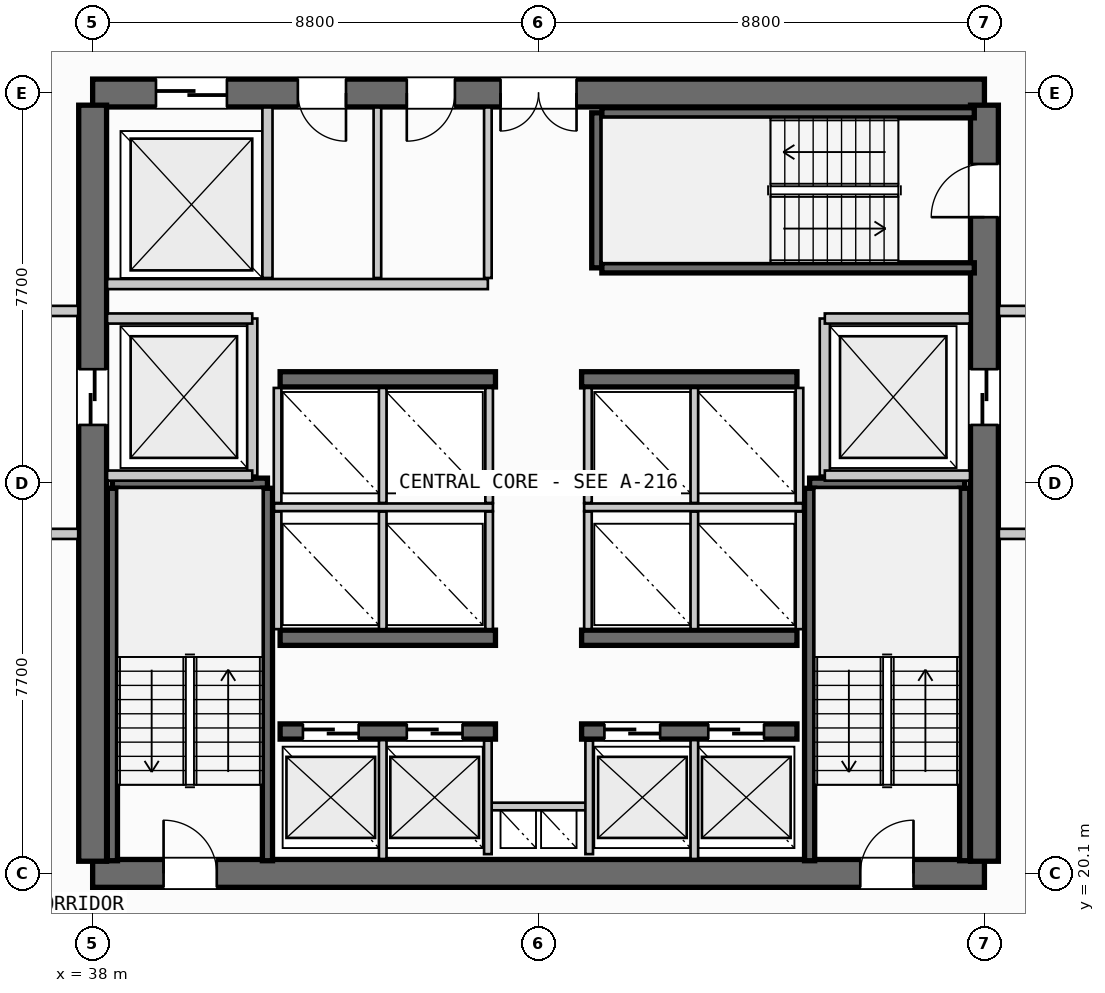
"""IFC4 building model, lengths in metres.
Left out: names, types, materials, properties, quantities, classifications, styles, units other than length and angle.
Written with IfcOpenShell. Run it as: python <this file> out.ifc"""

import sys

from ifc_helpers import new_model, si_unit, direction, frame, frame_2d, origin, place, context, subcontext, project, spatial, rectangle, extrude, source, transform, mapped, element, fill, save


model = new_model("IFC4")
c1 = context("Model", 3, precision=1e-05, world=origin(), true_north=direction((0.0, 1.0)))
c2 = subcontext(c1, "Body", "Model", "MODEL_VIEW")
j1 = project(units=[si_unit("LENGTHUNIT", "METRE"), si_unit("PLANEANGLEUNIT", "RADIAN")], contexts=[c1])
p1 = place(None, origin())
s1 = spatial("IfcSite", under=j1, at=p1, CompositionType="ELEMENT")
p2 = place(p1, origin())
s2 = spatial("IfcBuilding", under=s1, at=p2, CompositionType="ELEMENT")
p3 = place(p2, frame((0.0, 0.0, 118.0)))
s3 = spatial("IfcBuildingStorey", under=s2, at=p3, CompositionType="ELEMENT", Elevation=118.0)
p4 = place(p3, frame((38.0, 20.1, 0.0), z_axis=(0.0, 0.0, 1.0), x_axis=(1.0, 0.0, 0.0)))
e1 = element("IfcWall", 1, at=p4, inside=s3, PredefinedType="SHEAR", context=c2, shape_type="SweptSolid", body=[
    extrude(rectangle(XDim=17.6, YDim=0.55, at=frame_2d((8.8, 0.0))), origin(), (0.0, 0.0, 1.0), 3.35),
])
p5 = place(p4, frame((1.4, 0.0, 0.0)))
e2 = element("IfcOpeningElement", 2, at=p5, cuts=e1, PredefinedType="OPENING", context=c2, shape_type="SweptSolid", body=[
    extrude(rectangle(XDim=1.05, YDim=2.15, at=frame_2d((0.525, 1.075))), frame((0.0, 0.285, 0.0), z_axis=(0.0, -1.0, 0.0), x_axis=(1.0, 0.0, 0.0)), (0.0, 0.0, 1.0), 0.57),
])
p6 = place(p4, frame((15.15, 0.0, 0.0)))
e3 = element("IfcOpeningElement", 3, at=p6, cuts=e1, PredefinedType="OPENING", context=c2, shape_type="SweptSolid", body=[
    extrude(rectangle(XDim=1.05, YDim=2.15, at=frame_2d((0.525, 1.075))), frame((0.0, 0.285, 0.0), z_axis=(0.0, -1.0, 0.0), x_axis=(1.0, 0.0, 0.0)), (0.0, 0.0, 1.0), 0.57),
])
p7 = place(p3, frame((55.6, 35.5, 0.0), z_axis=(0.0, 0.0, 1.0), x_axis=(-1.0, 0.0, 0.0)))
e4 = element("IfcWall", 4, at=p7, inside=s3, PredefinedType="SHEAR", context=c2, shape_type="SweptSolid", body=[
    extrude(rectangle(XDim=17.6, YDim=0.55, at=frame_2d((8.8, 0.0))), origin(), (0.0, 0.0, 1.0), 3.35),
])
p8 = place(p7, frame((8.05, 0.0, 0.0)))
e5 = element("IfcOpeningElement", 5, at=p8, cuts=e4, PredefinedType="OPENING", context=c2, shape_type="SweptSolid", body=[
    extrude(rectangle(XDim=1.5, YDim=2.2, at=frame_2d((0.75, 1.1))), frame((0.0, 0.285, 0.0), z_axis=(0.0, -1.0, 0.0), x_axis=(1.0, 0.0, 0.0)), (0.0, 0.0, 1.0), 0.57),
])
p9 = place(p7, frame((14.95, 0.0, 0.0)))
e6 = element("IfcOpeningElement", 6, at=p9, cuts=e4, PredefinedType="OPENING", context=c2, shape_type="SweptSolid", body=[
    extrude(rectangle(XDim=1.4, YDim=2.3, at=frame_2d((0.7, 1.15))), frame((0.0, 0.285, 0.0), z_axis=(0.0, -1.0, 0.0), x_axis=(1.0, 0.0, 0.0)), (0.0, 0.0, 1.0), 0.57),
])
p10 = place(p7, frame((12.6, 0.0, 0.0)))
e7 = element("IfcOpeningElement", 7, at=p10, cuts=e4, PredefinedType="OPENING", context=c2, shape_type="SweptSolid", body=[
    extrude(rectangle(XDim=0.95, YDim=2.15, at=frame_2d((0.475, 1.075))), frame((0.0, 0.285, 0.0), z_axis=(0.0, -1.0, 0.0), x_axis=(1.0, 0.0, 0.0)), (0.0, 0.0, 1.0), 0.57),
])
p11 = place(p7, frame((10.45, 0.0, 0.0)))
e8 = element("IfcOpeningElement", 8, at=p11, cuts=e4, PredefinedType="OPENING", context=c2, shape_type="SweptSolid", body=[
    extrude(rectangle(XDim=0.95, YDim=2.15, at=frame_2d((0.475, 1.075))), frame((0.0, 0.285, 0.0), z_axis=(0.0, -1.0, 0.0), x_axis=(1.0, 0.0, 0.0)), (0.0, 0.0, 1.0), 0.57),
])
p12 = place(p3, frame((38.0, 35.26, 0.0), z_axis=(0.0, 0.0, 1.0), x_axis=(0.0, -1.0, 0.0)))
e9 = element("IfcWall", 9, at=p12, inside=s3, PredefinedType="SHEAR", context=c2, shape_type="SweptSolid", body=[
    extrude(rectangle(XDim=14.92, YDim=0.55, at=frame_2d((7.46, 0.0))), origin(), (0.0, 0.0, 1.0), 3.35),
])
p13 = place(p12, frame((5.21, 0.0, 0.0)))
e10 = element("IfcOpeningElement", 10, at=p13, cuts=e9, PredefinedType="OPENING", context=c2, shape_type="SweptSolid", body=[
    extrude(rectangle(XDim=1.1, YDim=2.2, at=frame_2d((0.55, 1.1))), frame((0.0, 0.285, 0.0), z_axis=(0.0, -1.0, 0.0), x_axis=(1.0, 0.0, 0.0)), (0.0, 0.0, 1.0), 0.57),
])
p14 = place(p3, frame((55.6, 20.34, 0.0), z_axis=(0.0, 0.0, 1.0), x_axis=(0.0, 1.0, 0.0)))
e11 = element("IfcWall", 11, at=p14, inside=s3, PredefinedType="SHEAR", context=c2, shape_type="SweptSolid", body=[
    extrude(rectangle(XDim=14.92, YDim=0.55, at=frame_2d((7.46, 0.0))), origin(), (0.0, 0.0, 1.0), 3.35),
])
p15 = place(p14, frame((12.71, 0.0, 0.0)))
e12 = element("IfcOpeningElement", 12, at=p15, cuts=e11, PredefinedType="OPENING", context=c2, shape_type="SweptSolid", body=[
    extrude(rectangle(XDim=1.05, YDim=2.15, at=frame_2d((0.525, 1.075))), frame((0.0, 0.285, 0.0), z_axis=(0.0, -1.0, 0.0), x_axis=(1.0, 0.0, 0.0)), (0.0, 0.0, 1.0), 0.57),
])
p16 = place(p14, frame((8.61, 0.0, 0.0)))
e13 = element("IfcOpeningElement", 13, at=p16, cuts=e11, PredefinedType="OPENING", context=c2, shape_type="SweptSolid", body=[
    extrude(rectangle(XDim=1.1, YDim=2.2, at=frame_2d((0.55, 1.1))), frame((0.0, 0.285, 0.0), z_axis=(0.0, -1.0, 0.0), x_axis=(1.0, 0.0, 0.0)), (0.0, 0.0, 1.0), 0.57),
])
p17 = place(p3, frame((41.7, 22.9, 0.0), z_axis=(0.0, 0.0, 1.0), x_axis=(1.0, 0.0, 0.0)))
e14 = element("IfcWall", 14, at=p17, inside=s3, PredefinedType="SHEAR", context=c2, shape_type="SweptSolid", body=[
    extrude(rectangle(XDim=4.25, YDim=0.3, at=frame_2d((2.125, 0.0))), origin(), (0.0, 0.0, 1.0), 3.35),
])
p18 = place(p17, frame((0.45, 0.0, 0.0)))
e15 = element("IfcOpeningElement", 15, at=p18, cuts=e14, PredefinedType="OPENING", context=c2, shape_type="SweptSolid", body=[
    extrude(rectangle(XDim=1.1, YDim=2.2, at=frame_2d((0.55, 1.1))), frame((0.0, 0.16, 0.0), z_axis=(0.0, -1.0, 0.0), x_axis=(1.0, 0.0, 0.0)), (0.0, 0.0, 1.0), 0.32),
])
p19 = place(p17, frame((2.5, 0.0, 0.0)))
e16 = element("IfcOpeningElement", 16, at=p19, cuts=e14, PredefinedType="OPENING", context=c2, shape_type="SweptSolid", body=[
    extrude(rectangle(XDim=1.1, YDim=2.2, at=frame_2d((0.55, 1.1))), frame((0.0, 0.16, 0.0), z_axis=(0.0, -1.0, 0.0), x_axis=(1.0, 0.0, 0.0)), (0.0, 0.0, 1.0), 0.32),
])
p20 = place(p3, frame((47.65, 22.9, 0.0), z_axis=(0.0, 0.0, 1.0), x_axis=(1.0, 0.0, 0.0)))
e17 = element("IfcWall", 17, at=p20, inside=s3, PredefinedType="SHEAR", context=c2, shape_type="SweptSolid", body=[
    extrude(rectangle(XDim=4.25, YDim=0.3, at=frame_2d((2.125, 0.0))), origin(), (0.0, 0.0, 1.0), 3.35),
])
p21 = place(p20, frame((0.45, 0.0, 0.0)))
e18 = element("IfcOpeningElement", 18, at=p21, cuts=e17, PredefinedType="OPENING", context=c2, shape_type="SweptSolid", body=[
    extrude(rectangle(XDim=1.1, YDim=2.2, at=frame_2d((0.55, 1.1))), frame((0.0, 0.16, 0.0), z_axis=(0.0, -1.0, 0.0), x_axis=(1.0, 0.0, 0.0)), (0.0, 0.0, 1.0), 0.32),
])
p22 = place(p20, frame((2.5, 0.0, 0.0)))
e19 = element("IfcOpeningElement", 19, at=p22, cuts=e17, PredefinedType="OPENING", context=c2, shape_type="SweptSolid", body=[
    extrude(rectangle(XDim=1.1, YDim=2.2, at=frame_2d((0.55, 1.1))), frame((0.0, 0.16, 0.0), z_axis=(0.0, -1.0, 0.0), x_axis=(1.0, 0.0, 0.0)), (0.0, 0.0, 1.0), 0.32),
])
for number, where, z_axis, x_axis in (
    (20, (41.7, 24.75, 0.0), (0.0, 0.0, 1.0), (1.0, 0.0, 0.0)),
    (21, (47.65, 24.75, 0.0), (0.0, 0.0, 1.0), (1.0, 0.0, 0.0)),
    (22, (41.7, 29.85, 0.0), (0.0, 0.0, 1.0), (1.0, 0.0, 0.0)),
    (23, (47.65, 29.85, 0.0), (0.0, 0.0, 1.0), (1.0, 0.0, 0.0)),
):
    element("IfcWall", number, at=place(p3, frame(where, z_axis=z_axis, x_axis=x_axis)), inside=s3, PredefinedType="SHEAR", context=c2, shape_type="SweptSolid", body=[
        extrude(rectangle(XDim=4.25, YDim=0.3, at=frame_2d((2.125, 0.0))), origin(), (0.0, 0.0, 1.0), 3.35),
    ])
p23 = place(p3, frame((38.39, 27.8, 0.0), z_axis=(0.0, 0.0, 1.0), x_axis=(1.0, 0.0, 0.0)))
e24 = element("IfcWall", 24, at=p23, inside=s3, PredefinedType="SHEAR", context=c2, shape_type="SweptSolid", body=[
    extrude(rectangle(XDim=3.06, YDim=0.2, at=frame_2d((1.53, 0.0))), origin(), (0.0, 0.0, 1.0), 3.35),
])
for number, where, z_axis, x_axis in (
    (25, (41.45, 27.7, 0.0), (0.0, 0.0, 1.0), (0.0, -1.0, 0.0)),
    (26, (38.39, 20.35, 0.0), (0.0, 0.0, 1.0), (0.0, 1.0, 0.0)),
):
    element("IfcWall", number, at=place(p3, frame(where, z_axis=z_axis, x_axis=x_axis)), inside=s3, PredefinedType="SHEAR", context=c2, shape_type="SweptSolid", body=[
        extrude(rectangle(XDim=7.35, YDim=0.2, at=frame_2d((3.675, 0.0))), origin(), (0.0, 0.0, 1.0), 3.35),
    ])
p24 = place(p3, frame((52.15, 27.8, 0.0), z_axis=(0.0, 0.0, 1.0), x_axis=(1.0, 0.0, 0.0)))
e27 = element("IfcWall", 27, at=p24, inside=s3, PredefinedType="SHEAR", context=c2, shape_type="SweptSolid", body=[
    extrude(rectangle(XDim=3.06, YDim=0.2, at=frame_2d((1.53, 0.0))), origin(), (0.0, 0.0, 1.0), 3.35),
])
for number, where, z_axis, x_axis in (
    (28, (55.21, 27.7, 0.0), (0.0, 0.0, 1.0), (0.0, -1.0, 0.0)),
    (29, (52.15, 20.35, 0.0), (0.0, 0.0, 1.0), (0.0, 1.0, 0.0)),
):
    element("IfcWall", number, at=place(p3, frame(where, z_axis=z_axis, x_axis=x_axis)), inside=s3, PredefinedType="SHEAR", context=c2, shape_type="SweptSolid", body=[
        extrude(rectangle(XDim=7.35, YDim=0.2, at=frame_2d((3.675, 0.0))), origin(), (0.0, 0.0, 1.0), 3.35),
    ])
p25 = place(p3, frame((47.95, 32.05, 0.0), z_axis=(0.0, 0.0, 1.0), x_axis=(0.0, 1.0, 0.0)))
e30 = element("IfcWall", 30, at=p25, inside=s3, PredefinedType="SHEAR", context=c2, shape_type="SweptSolid", body=[
    extrude(rectangle(XDim=3.06, YDim=0.2, at=frame_2d((1.53, 0.0))), origin(), (0.0, 0.0, 1.0), 3.35),
])
for number, where, z_axis, x_axis in (
    (31, (48.05, 35.11, 0.0), (0.0, 0.0, 1.0), (1.0, 0.0, 0.0)),
    (32, (55.4, 32.05, 0.0), (0.0, 0.0, 1.0), (-1.0, 0.0, 0.0)),
):
    element("IfcWall", number, at=place(p3, frame(where, z_axis=z_axis, x_axis=x_axis)), inside=s3, PredefinedType="SHEAR", context=c2, shape_type="SweptSolid", body=[
        extrude(rectangle(XDim=7.35, YDim=0.2, at=frame_2d((3.675, 0.0))), origin(), (0.0, 0.0, 1.0), 3.35),
    ])
p26 = place(p3, frame((45.8, 21.42, 0.0), z_axis=(0.0, 0.0, 1.0), x_axis=(1.0, 0.0, 0.0)))
e33 = element("IfcWall", 33, at=p26, inside=s3, PredefinedType="PARTITIONING", context=c2, shape_type="SweptSolid", body=[
    extrude(rectangle(XDim=2.0, YDim=0.15, at=frame_2d((1.0, 0.0))), origin(), (0.0, 0.0, 1.0), 2.775),
])
for number, where, z_axis, x_axis in (
    (34, (45.8, 20.48, 0.0), (0.0, 0.0, 1.0), (0.0, 1.0, 0.0)),
    (35, (47.8, 20.48, 0.0), (0.0, 0.0, 1.0), (0.0, 1.0, 0.0)),
):
    element("IfcWall", number, at=place(p3, frame(where, z_axis=z_axis, x_axis=x_axis)), inside=s3, PredefinedType="PARTITIONING", context=c2, shape_type="SweptSolid", body=[
        extrude(rectangle(XDim=2.24, YDim=0.15, at=frame_2d((1.12, 0.0))), origin(), (0.0, 0.0, 1.0), 2.775),
    ])
p27 = place(p3, frame((41.15, 27.95, 0.0), z_axis=(0.0, 0.0, 1.0), x_axis=(0.0, 1.0, 0.0)))
e36 = element("IfcWall", 36, at=p27, inside=s3, PredefinedType="PARTITIONING", context=c2, shape_type="SweptSolid", body=[
    extrude(rectangle(XDim=3.1, YDim=0.2, at=frame_2d((1.55, 0.0))), origin(), (0.0, 0.0, 1.0), 2.775),
])
for number, where, z_axis, x_axis in (
    (37, (38.285, 27.95, 0.0), (0.0, 0.0, 1.0), (1.0, 0.0, 0.0)),
    (38, (38.285, 31.05, 0.0), (0.0, 0.0, 1.0), (1.0, 0.0, 0.0)),
):
    element("IfcWall", number, at=place(p3, frame(where, z_axis=z_axis, x_axis=x_axis)), inside=s3, PredefinedType="PARTITIONING", context=c2, shape_type="SweptSolid", body=[
        extrude(rectangle(XDim=2.865, YDim=0.2, at=frame_2d((1.433, 0.0))), origin(), (0.0, 0.0, 1.0), 2.775),
    ])
for number, where, z_axis, x_axis in (
    (39, (34.5, 26.8, 0.0), (0.0, 0.0, 1.0), (1.0, 0.0, 0.0)),
    (40, (34.5, 31.2, 0.0), (0.0, 0.0, 1.0), (1.0, 0.0, 0.0)),
):
    element("IfcWall", number, at=place(p3, frame(where, z_axis=z_axis, x_axis=x_axis)), inside=s3, PredefinedType="PARTITIONING", context=c2, shape_type="SweptSolid", body=[
        extrude(rectangle(XDim=3.215, YDim=0.2, at=frame_2d((1.607, 0.0))), origin(), (0.0, 0.0, 1.0), 2.775),
    ])
p28 = place(p3, frame((52.45, 27.95, 0.0), z_axis=(0.0, 0.0, 1.0), x_axis=(0.0, 1.0, 0.0)))
e41 = element("IfcWall", 41, at=p28, inside=s3, PredefinedType="PARTITIONING", context=c2, shape_type="SweptSolid", body=[
    extrude(rectangle(XDim=3.1, YDim=0.2, at=frame_2d((1.55, 0.0))), origin(), (0.0, 0.0, 1.0), 2.775),
])
for number, where, z_axis, x_axis in (
    (42, (52.45, 27.95, 0.0), (0.0, 0.0, 1.0), (1.0, 0.0, 0.0)),
    (43, (52.45, 31.05, 0.0), (0.0, 0.0, 1.0), (1.0, 0.0, 0.0)),
):
    element("IfcWall", number, at=place(p3, frame(where, z_axis=z_axis, x_axis=x_axis)), inside=s3, PredefinedType="PARTITIONING", context=c2, shape_type="SweptSolid", body=[
        extrude(rectangle(XDim=2.865, YDim=0.2, at=frame_2d((1.433, 0.0))), origin(), (0.0, 0.0, 1.0), 2.775),
    ])
for number, where, z_axis, x_axis in (
    (44, (55.885, 26.8, 0.0), (0.0, 0.0, 1.0), (1.0, 0.0, 0.0)),
    (45, (55.885, 31.2, 0.0), (0.0, 0.0, 1.0), (1.0, 0.0, 0.0)),
):
    element("IfcWall", number, at=place(p3, frame(where, z_axis=z_axis, x_axis=x_axis)), inside=s3, PredefinedType="PARTITIONING", context=c2, shape_type="SweptSolid", body=[
        extrude(rectangle(XDim=3.215, YDim=0.2, at=frame_2d((1.607, 0.0))), origin(), (0.0, 0.0, 1.0), 2.775),
    ])
for number, where, z_axis, x_axis in (
    (46, (43.725, 20.385, 0.0), (0.0, 0.0, 1.0), (0.0, 1.0, 0.0)),
    (47, (49.875, 20.385, 0.0), (0.0, 0.0, 1.0), (0.0, 1.0, 0.0)),
):
    element("IfcWall", number, at=place(p3, frame(where, z_axis=z_axis, x_axis=x_axis)), inside=s3, PredefinedType="PARTITIONING", context=c2, shape_type="SweptSolid", body=[
        extrude(rectangle(XDim=2.345, YDim=0.15, at=frame_2d((1.172, 0.0))), origin(), (0.0, 0.0, 1.0), 2.775),
    ])
p29 = place(p3, frame((41.58, 27.325, 0.0), z_axis=(0.0, 0.0, 1.0), x_axis=(1.0, 0.0, 0.0)))
e48 = element("IfcWall", 48, at=p29, inside=s3, PredefinedType="PARTITIONING", context=c2, shape_type="SweptSolid", body=[
    extrude(rectangle(XDim=4.32, YDim=0.15, at=frame_2d((2.16, 0.0))), origin(), (0.0, 0.0, 1.0), 2.775),
])
p30 = place(p3, frame((47.7, 27.325, 0.0), z_axis=(0.0, 0.0, 1.0), x_axis=(1.0, 0.0, 0.0)))
e49 = element("IfcWall", 49, at=p30, inside=s3, PredefinedType="PARTITIONING", context=c2, shape_type="SweptSolid", body=[
    extrude(rectangle(XDim=4.32, YDim=0.15, at=frame_2d((2.16, 0.0))), origin(), (0.0, 0.0, 1.0), 2.775),
])
for number, where, z_axis, x_axis in (
    (50, (41.65, 24.92, 0.0), (0.0, 0.0, 1.0), (0.0, 1.0, 0.0)),
    (51, (43.725, 24.92, 0.0), (0.0, 0.0, 1.0), (0.0, 1.0, 0.0)),
    (52, (45.825, 24.92, 0.0), (0.0, 0.0, 1.0), (0.0, 1.0, 0.0)),
    (53, (47.775, 24.92, 0.0), (0.0, 0.0, 1.0), (0.0, 1.0, 0.0)),
    (54, (49.875, 24.92, 0.0), (0.0, 0.0, 1.0), (0.0, 1.0, 0.0)),
    (55, (51.95, 24.92, 0.0), (0.0, 0.0, 1.0), (0.0, 1.0, 0.0)),
):
    element("IfcWall", number, at=place(p3, frame(where, z_axis=z_axis, x_axis=x_axis)), inside=s3, PredefinedType="PARTITIONING", context=c2, shape_type="SweptSolid", body=[
        extrude(rectangle(XDim=2.32, YDim=0.15, at=frame_2d((1.16, 0.0))), origin(), (0.0, 0.0, 1.0), 2.775),
    ])
for number, where, z_axis, x_axis in (
    (56, (41.65, 27.41, 0.0), (0.0, 0.0, 1.0), (0.0, 1.0, 0.0)),
    (57, (43.725, 27.41, 0.0), (0.0, 0.0, 1.0), (0.0, 1.0, 0.0)),
    (58, (45.825, 27.41, 0.0), (0.0, 0.0, 1.0), (0.0, 1.0, 0.0)),
    (59, (47.775, 27.41, 0.0), (0.0, 0.0, 1.0), (0.0, 1.0, 0.0)),
    (60, (49.875, 27.41, 0.0), (0.0, 0.0, 1.0), (0.0, 1.0, 0.0)),
    (61, (51.95, 27.41, 0.0), (0.0, 0.0, 1.0), (0.0, 1.0, 0.0)),
):
    element("IfcWall", number, at=place(p3, frame(where, z_axis=z_axis, x_axis=x_axis)), inside=s3, PredefinedType="PARTITIONING", context=c2, shape_type="SweptSolid", body=[
        extrude(rectangle(XDim=2.27, YDim=0.15, at=frame_2d((1.135, 0.0))), origin(), (0.0, 0.0, 1.0), 2.775),
    ])
p31 = place(p3, frame((41.45, 31.85, 0.0), z_axis=(0.0, 0.0, 1.0), x_axis=(0.0, 1.0, 0.0)))
e62 = element("IfcWall", 62, at=p31, inside=s3, PredefinedType="PARTITIONING", context=c2, shape_type="SweptSolid", body=[
    extrude(rectangle(XDim=3.365, YDim=0.2, at=frame_2d((1.683, 0.0))), origin(), (0.0, 0.0, 1.0), 2.775),
])
p32 = place(p3, frame((38.285, 31.73, 0.0), z_axis=(0.0, 0.0, 1.0), x_axis=(1.0, 0.0, 0.0)))
e63 = element("IfcWall", 63, at=p32, inside=s3, PredefinedType="PARTITIONING", context=c2, shape_type="SweptSolid", body=[
    extrude(rectangle(XDim=7.515, YDim=0.2, at=frame_2d((3.758, 0.0))), origin(), (0.0, 0.0, 1.0), 2.775),
])
p33 = place(p3, frame((45.8, 31.85, 0.0), z_axis=(0.0, 0.0, 1.0), x_axis=(0.0, 1.0, 0.0)))
e64 = element("IfcWall", 64, at=p33, inside=s3, PredefinedType="PARTITIONING", context=c2, shape_type="SweptSolid", body=[
    extrude(rectangle(XDim=3.365, YDim=0.15, at=frame_2d((1.683, 0.0))), origin(), (0.0, 0.0, 1.0), 2.775),
])
p34 = place(p3, frame((43.62, 31.85, 0.0), z_axis=(0.0, 0.0, 1.0), x_axis=(0.0, 1.0, 0.0)))
e65 = element("IfcWall", 65, at=p34, inside=s3, PredefinedType="PLUMBINGWALL", context=c2, shape_type="SweptSolid", body=[
    extrude(rectangle(XDim=3.365, YDim=0.15, at=frame_2d((1.683, 0.0))), origin(), (0.0, 0.0, 1.0), 2.775),
])
m1 = source(origin(), c2, "Body", "SweptSolid", [
    extrude(rectangle(XDim=1.05, YDim=2.15, at=frame_2d((0.525, 1.075))), frame((0.0, 0.025, 0.0), z_axis=(0.0, -1.0, 0.0), x_axis=(1.0, 0.0, 0.0)), (0.0, 0.0, 1.0), 0.05),
])
p35 = place(p5, origin())
e66 = element("IfcDoor", 66, at=p35, inside=s3, OperationType="SINGLE_SWING_LEFT", PredefinedType="DOOR", context=c2, shape_type="MappedRepresentation", body=[
    mapped(m1, transform((0.0, 0.0, 0.0), scale=1.0)),
])
fill(e2, e66)
p36 = place(p6, origin())
e67 = element("IfcDoor", 67, at=p36, inside=s3, OperationType="SINGLE_SWING_RIGHT", PredefinedType="DOOR", context=c2, shape_type="MappedRepresentation", body=[
    mapped(m1, transform((0.0, 0.0, 0.0), scale=1.0)),
])
fill(e3, e67)
p37 = place(p15, origin())
e68 = element("IfcDoor", 68, at=p37, inside=s3, OperationType="SINGLE_SWING_LEFT", PredefinedType="DOOR", context=c2, shape_type="MappedRepresentation", body=[
    mapped(m1, transform((0.0, 0.0, 0.0), scale=1.0)),
])
fill(e12, e68)
m2 = source(origin(), c2, "Body", "SweptSolid", [
    extrude(rectangle(XDim=1.5, YDim=2.2, at=frame_2d((0.75, 1.1))), frame((0.0, 0.025, 0.0), z_axis=(0.0, -1.0, 0.0), x_axis=(1.0, 0.0, 0.0)), (0.0, 0.0, 1.0), 0.05),
])
p38 = place(p8, origin())
e69 = element("IfcDoor", 69, at=p38, inside=s3, OperationType="DOUBLE_DOOR_SINGLE_SWING", PredefinedType="DOOR", context=c2, shape_type="MappedRepresentation", body=[
    mapped(m2, transform((0.0, 0.0, 0.0), scale=1.0)),
])
fill(e5, e69)
m3 = source(origin(), c2, "Body", "SweptSolid", [
    extrude(rectangle(XDim=1.1, YDim=2.2, at=frame_2d((0.55, 1.1))), frame((0.0, 0.025, 0.0), z_axis=(0.0, -1.0, 0.0), x_axis=(1.0, 0.0, 0.0)), (0.0, 0.0, 1.0), 0.05),
])
p39 = place(p13, origin())
e70 = element("IfcDoor", 70, at=p39, inside=s3, OperationType="SLIDING_TO_LEFT", PredefinedType="DOOR", context=c2, shape_type="MappedRepresentation", body=[
    mapped(m3, transform((0.0, 0.0, 0.0), scale=1.0)),
])
fill(e10, e70)
p40 = place(p16, origin())
e71 = element("IfcDoor", 71, at=p40, inside=s3, OperationType="SLIDING_TO_RIGHT", PredefinedType="DOOR", context=c2, shape_type="MappedRepresentation", body=[
    mapped(m3, transform((0.0, 0.0, 0.0), scale=1.0)),
])
fill(e13, e71)
p41 = place(p18, origin())
e72 = element("IfcDoor", 72, at=p41, inside=s3, OperationType="SLIDING_TO_LEFT", PredefinedType="DOOR", context=c2, shape_type="MappedRepresentation", body=[
    mapped(m3, transform((0.0, 0.0, 0.0), scale=1.0)),
])
fill(e15, e72)
p42 = place(p19, origin())
e73 = element("IfcDoor", 73, at=p42, inside=s3, OperationType="SLIDING_TO_LEFT", PredefinedType="DOOR", context=c2, shape_type="MappedRepresentation", body=[
    mapped(m3, transform((0.0, 0.0, 0.0), scale=1.0)),
])
fill(e16, e73)
p43 = place(p21, origin())
e74 = element("IfcDoor", 74, at=p43, inside=s3, OperationType="SLIDING_TO_LEFT", PredefinedType="DOOR", context=c2, shape_type="MappedRepresentation", body=[
    mapped(m3, transform((0.0, 0.0, 0.0), scale=1.0)),
])
fill(e18, e74)
p44 = place(p22, origin())
e75 = element("IfcDoor", 75, at=p44, inside=s3, OperationType="SLIDING_TO_LEFT", PredefinedType="DOOR", context=c2, shape_type="MappedRepresentation", body=[
    mapped(m3, transform((0.0, 0.0, 0.0), scale=1.0)),
])
fill(e19, e75)
m4 = source(origin(), c2, "Body", "SweptSolid", [
    extrude(rectangle(XDim=1.4, YDim=2.3, at=frame_2d((0.7, 1.15))), frame((0.0, 0.025, 0.0), z_axis=(0.0, -1.0, 0.0), x_axis=(1.0, 0.0, 0.0)), (0.0, 0.0, 1.0), 0.05),
])
p45 = place(p9, origin())
e76 = element("IfcDoor", 76, at=p45, inside=s3, OperationType="SLIDING_TO_RIGHT", PredefinedType="DOOR", context=c2, shape_type="MappedRepresentation", body=[
    mapped(m4, transform((0.0, 0.0, 0.0), scale=1.0)),
])
fill(e6, e76)
m5 = source(origin(), c2, "Body", "SweptSolid", [
    extrude(rectangle(XDim=0.95, YDim=2.15, at=frame_2d((0.475, 1.075))), frame((0.0, 0.025, 0.0), z_axis=(0.0, -1.0, 0.0), x_axis=(1.0, 0.0, 0.0)), (0.0, 0.0, 1.0), 0.05),
])
p46 = place(p10, origin())
e77 = element("IfcDoor", 77, at=p46, inside=s3, OperationType="SINGLE_SWING_LEFT", PredefinedType="DOOR", context=c2, shape_type="MappedRepresentation", body=[
    mapped(m5, transform((0.0, 0.0, 0.0), scale=1.0)),
])
fill(e7, e77)
p47 = place(p11, origin())
e78 = element("IfcDoor", 78, at=p47, inside=s3, OperationType="SINGLE_SWING_RIGHT", PredefinedType="DOOR", context=c2, shape_type="MappedRepresentation", body=[
    mapped(m5, transform((0.0, 0.0, 0.0), scale=1.0)),
])
fill(e8, e78)
save(model, sys.argv[1])
